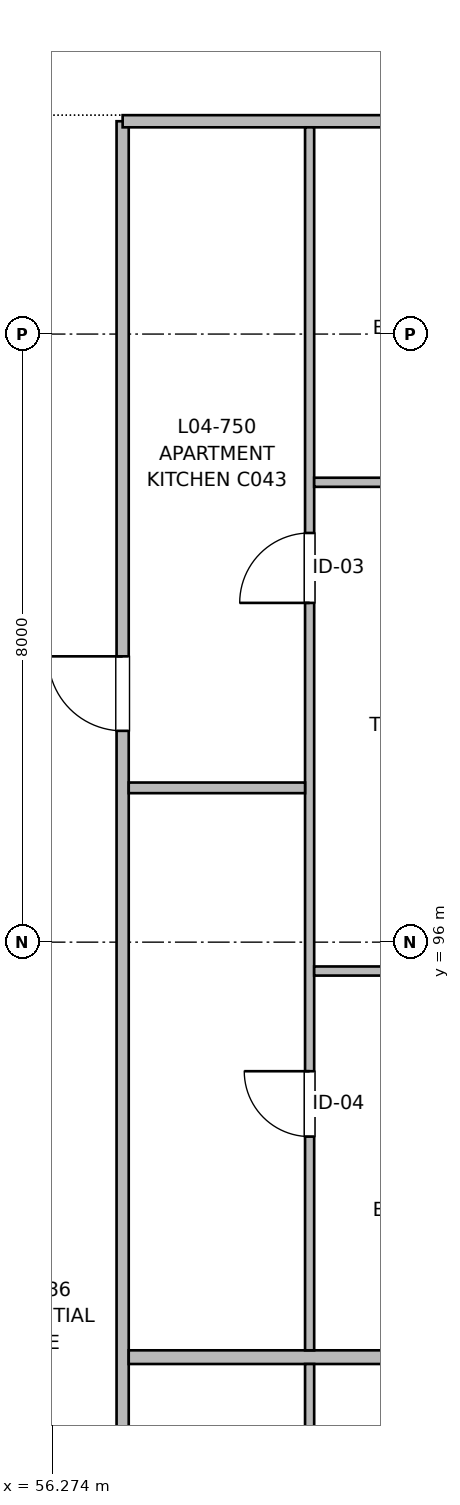
"""IFC4 building model, lengths in metres.
Left out: names, types, materials, properties, quantities, classifications, styles, units other than length and angle.
Written with IfcOpenShell. Run it as: python <this file> out.ifc"""

import sys

from ifc_helpers import new_model, si_unit, direction, frame, frame_2d, origin, place, context, subcontext, project, spatial, rectangle, extrude, element, fill, save


model = new_model("IFC4")
c1 = context("Model", 3, precision=1e-05, world=origin(), true_north=direction((0.0, 1.0)))
c2 = subcontext(c1, "Body", "Model", "MODEL_VIEW")
j1 = project(units=[si_unit("LENGTHUNIT", "METRE"), si_unit("PLANEANGLEUNIT", "RADIAN")], contexts=[c1])
p1 = place(None, origin())
s1 = spatial("IfcSite", under=j1, at=p1, CompositionType="ELEMENT")
p2 = place(p1, origin())
s2 = spatial("IfcBuilding", under=s1, at=p2, CompositionType="ELEMENT")
p3 = place(p2, frame((0.0, 0.0, 13.76)))
s3 = spatial("IfcBuildingStorey", under=s2, at=p3, CompositionType="ELEMENT", Elevation=13.76)
p4 = place(p3, frame((57.2, 56.16, 0.0), z_axis=(0.0, 0.0, 1.0), x_axis=(0.0, 1.0, 0.0)))
e1 = element("IfcWall", 1, at=p4, inside=s3, PredefinedType="PARTITIONING", context=c2, shape_type="SweptSolid", body=[
    extrude(rectangle(XDim=50.64, YDim=0.16, at=frame_2d((25.32, 0.0))), origin(), (0.0, 0.0, 1.0), 2.935),
])
p5 = place(p4, frame((8.62, 0.0, 0.0)))
e2 = element("IfcOpeningElement", 2, at=p5, cuts=e1, PredefinedType="OPENING", context=c2, shape_type="SweptSolid", body=[
    extrude(rectangle(XDim=0.98, YDim=2.15, at=frame_2d((0.49, 1.075))), frame((0.0, 0.09, 0.0), z_axis=(0.0, -1.0, 0.0), x_axis=(1.0, 0.0, 0.0)), (0.0, 0.0, 1.0), 0.18),
])
p6 = place(p4, frame((25.85, 0.0, 0.0)))
e3 = element("IfcOpeningElement", 3, at=p6, cuts=e1, PredefinedType="OPENING", context=c2, shape_type="SweptSolid", body=[
    extrude(rectangle(XDim=0.98, YDim=2.15, at=frame_2d((0.49, 1.075))), frame((0.0, 0.09, 0.0), z_axis=(0.0, -1.0, 0.0), x_axis=(1.0, 0.0, 0.0)), (0.0, 0.0, 1.0), 0.18),
])
p7 = place(p4, frame((42.62, 0.0, 0.0)))
e4 = element("IfcOpeningElement", 4, at=p7, cuts=e1, PredefinedType="OPENING", context=c2, shape_type="SweptSolid", body=[
    extrude(rectangle(XDim=0.98, YDim=2.15, at=frame_2d((0.49, 1.075))), frame((0.0, 0.09, 0.0), z_axis=(0.0, -1.0, 0.0), x_axis=(1.0, 0.0, 0.0)), (0.0, 0.0, 1.0), 0.18),
])
p8 = place(p3, frame((57.2, 106.8, 0.0), z_axis=(0.0, 0.0, 1.0), x_axis=(1.0, 0.0, 0.0)))
e5 = element("IfcWall", 5, at=p8, inside=s3, PredefinedType="PARTITIONING", context=c2, shape_type="SweptSolid", body=[
    extrude(rectangle(XDim=24.14, YDim=0.16, at=frame_2d((12.07, 0.0))), origin(), (0.0, 0.0, 1.0), 2.935),
])
p9 = place(p8, frame((19.575, 0.0, 0.0)))
e6 = element("IfcOpeningElement", 6, at=p9, cuts=e5, PredefinedType="OPENING", context=c2, shape_type="SweptSolid", body=[
    extrude(rectangle(XDim=1.05, YDim=2.15, at=frame_2d((0.525, 1.075))), frame((0.0, 0.09, 0.0), z_axis=(0.0, -1.0, 0.0), x_axis=(1.0, 0.0, 0.0)), (0.0, 0.0, 1.0), 0.18),
])
p10 = place(p8, frame((8.995, 0.0, 0.0)))
e7 = element("IfcOpeningElement", 7, at=p10, cuts=e5, PredefinedType="OPENING", context=c2, shape_type="SweptSolid", body=[
    extrude(rectangle(XDim=0.98, YDim=2.15, at=frame_2d((0.49, 1.075))), frame((0.0, 0.09, 0.0), z_axis=(0.0, -1.0, 0.0), x_axis=(1.0, 0.0, 0.0)), (0.0, 0.0, 1.0), 0.18),
])
p11 = place(p3, frame((57.28, 90.54, 0.0), z_axis=(0.0, 0.0, 1.0), x_axis=(1.0, 0.0, 0.0)))
e8 = element("IfcWall", 8, at=p11, inside=s3, PredefinedType="PARTITIONING", context=c2, shape_type="SweptSolid", body=[
    extrude(rectangle(XDim=8.707, YDim=0.18, at=frame_2d((4.353, 0.0))), origin(), (0.0, 0.0, 1.0), 2.935),
])
p12 = place(p3, frame((59.66, 73.44, 0.0), z_axis=(0.0, 0.0, 1.0), x_axis=(0.0, 1.0, 0.0)))
e9 = element("IfcWall", 9, at=p12, inside=s3, PredefinedType="PARTITIONING", context=c2, shape_type="SweptSolid", body=[
    extrude(rectangle(XDim=17.01, YDim=0.12, at=frame_2d((8.505, 0.0))), origin(), (0.0, 0.0, 1.0), 2.935),
])
p13 = place(p12, frame((2.972, 0.0, 0.0)))
e10 = element("IfcOpeningElement", 10, at=p13, cuts=e9, PredefinedType="OPENING", context=c2, shape_type="SweptSolid", body=[
    extrude(rectangle(XDim=0.86, YDim=2.1, at=frame_2d((0.43, 1.05))), frame((0.0, 0.07, 0.0), z_axis=(0.0, -1.0, 0.0), x_axis=(1.0, 0.0, 0.0)), (0.0, 0.0, 1.0), 0.14),
])
p14 = place(p12, frame((10.393, 0.0, 0.0)))
e11 = element("IfcOpeningElement", 11, at=p14, cuts=e9, PredefinedType="OPENING", context=c2, shape_type="SweptSolid", body=[
    extrude(rectangle(XDim=0.92, YDim=2.1, at=frame_2d((0.46, 1.05))), frame((0.0, 0.07, 0.0), z_axis=(0.0, -1.0, 0.0), x_axis=(1.0, 0.0, 0.0)), (0.0, 0.0, 1.0), 0.14),
])
p15 = place(p3, frame((59.66, 90.63, 0.0), z_axis=(0.0, 0.0, 1.0), x_axis=(0.0, 1.0, 0.0)))
e12 = element("IfcWall", 12, at=p15, inside=s3, PredefinedType="PARTITIONING", context=c2, shape_type="SweptSolid", body=[
    extrude(rectangle(XDim=16.09, YDim=0.12, at=frame_2d((8.045, 0.0))), origin(), (0.0, 0.0, 1.0), 2.935),
])
p16 = place(p15, frame((2.812, 0.0, 0.0)))
e13 = element("IfcOpeningElement", 13, at=p16, cuts=e12, PredefinedType="OPENING", context=c2, shape_type="SweptSolid", body=[
    extrude(rectangle(XDim=0.86, YDim=2.1, at=frame_2d((0.43, 1.05))), frame((0.0, 0.07, 0.0), z_axis=(0.0, -1.0, 0.0), x_axis=(1.0, 0.0, 0.0)), (0.0, 0.0, 1.0), 0.14),
])
p17 = place(p15, frame((9.833, 0.0, 0.0)))
e14 = element("IfcOpeningElement", 14, at=p17, cuts=e12, PredefinedType="OPENING", context=c2, shape_type="SweptSolid", body=[
    extrude(rectangle(XDim=0.92, YDim=2.1, at=frame_2d((0.46, 1.05))), frame((0.0, 0.07, 0.0), z_axis=(0.0, -1.0, 0.0), x_axis=(1.0, 0.0, 0.0)), (0.0, 0.0, 1.0), 0.14),
])
p18 = place(p3, frame((57.28, 98.03, 0.0), z_axis=(0.0, 0.0, 1.0), x_axis=(1.0, 0.0, 0.0)))
e15 = element("IfcWall", 15, at=p18, inside=s3, PredefinedType="PARTITIONING", context=c2, shape_type="SweptSolid", body=[
    extrude(rectangle(XDim=2.32, YDim=0.14, at=frame_2d((1.16, 0.0))), origin(), (0.0, 0.0, 1.0), 2.935),
])
p19 = place(p3, frame((59.72, 95.62, 0.0), z_axis=(0.0, 0.0, 1.0), x_axis=(1.0, 0.0, 0.0)))
e16 = element("IfcWall", 16, at=p19, inside=s3, PredefinedType="PARTITIONING", context=c2, shape_type="SweptSolid", body=[
    extrude(rectangle(XDim=10.968, YDim=0.12, at=frame_2d((5.484, 0.0))), origin(), (0.0, 0.0, 1.0), 2.935),
])
p20 = place(p19, frame((1.645, 0.0, 0.0)))
e17 = element("IfcOpeningElement", 17, at=p20, cuts=e16, PredefinedType="OPENING", context=c2, shape_type="SweptSolid", body=[
    extrude(rectangle(XDim=0.9, YDim=2.1, at=frame_2d((0.45, 1.05))), frame((0.0, 0.07, 0.0), z_axis=(0.0, -1.0, 0.0), x_axis=(1.0, 0.0, 0.0)), (0.0, 0.0, 1.0), 0.14),
])
p21 = place(p3, frame((59.72, 102.05, 0.0), z_axis=(0.0, 0.0, 1.0), x_axis=(1.0, 0.0, 0.0)))
e18 = element("IfcWall", 18, at=p21, inside=s3, PredefinedType="PARTITIONING", context=c2, shape_type="SweptSolid", body=[
    extrude(rectangle(XDim=4.19, YDim=0.12, at=frame_2d((2.095, 0.0))), origin(), (0.0, 0.0, 1.0), 2.935),
])
p22 = place(p21, frame((1.655, 0.0, 0.0)))
e19 = element("IfcOpeningElement", 19, at=p22, cuts=e18, PredefinedType="OPENING", context=c2, shape_type="SweptSolid", body=[
    extrude(rectangle(XDim=0.88, YDim=2.1, at=frame_2d((0.44, 1.05))), frame((0.0, 0.07, 0.0), z_axis=(0.0, -1.0, 0.0), x_axis=(1.0, 0.0, 0.0)), (0.0, 0.0, 1.0), 0.14),
])
p23 = place(p16, origin())
e20 = element("IfcDoor", 20, at=p23, inside=s3, OperationType="SINGLE_SWING_RIGHT", PredefinedType="DOOR", context=c2, shape_type="SweptSolid", body=[
    extrude(rectangle(XDim=0.86, YDim=2.1, at=frame_2d((0.43, 1.05))), frame((0.0, 0.025, 0.0), z_axis=(0.0, -1.0, 0.0), x_axis=(1.0, 0.0, 0.0)), (0.0, 0.0, 1.0), 0.05),
])
fill(e13, e20)
p24 = place(p17, origin())
e21 = element("IfcDoor", 21, at=p24, inside=s3, OperationType="SINGLE_SWING_LEFT", PredefinedType="DOOR", context=c2, shape_type="SweptSolid", body=[
    extrude(rectangle(XDim=0.92, YDim=2.1, at=frame_2d((0.46, 1.05))), frame((0.0, 0.025, 0.0), z_axis=(0.0, -1.0, 0.0), x_axis=(1.0, 0.0, 0.0)), (0.0, 0.0, 1.0), 0.05),
])
fill(e14, e21)
p25 = place(p7, origin())
e22 = element("IfcDoor", 22, at=p25, inside=s3, OperationType="SINGLE_SWING_RIGHT", PredefinedType="DOOR", context=c2, shape_type="SweptSolid", body=[
    extrude(rectangle(XDim=0.98, YDim=2.15, at=frame_2d((0.49, 1.075))), frame((0.0, 0.025, 0.0), z_axis=(0.0, -1.0, 0.0), x_axis=(1.0, 0.0, 0.0)), (0.0, 0.0, 1.0), 0.05),
])
fill(e4, e22)
save(model, sys.argv[1])
